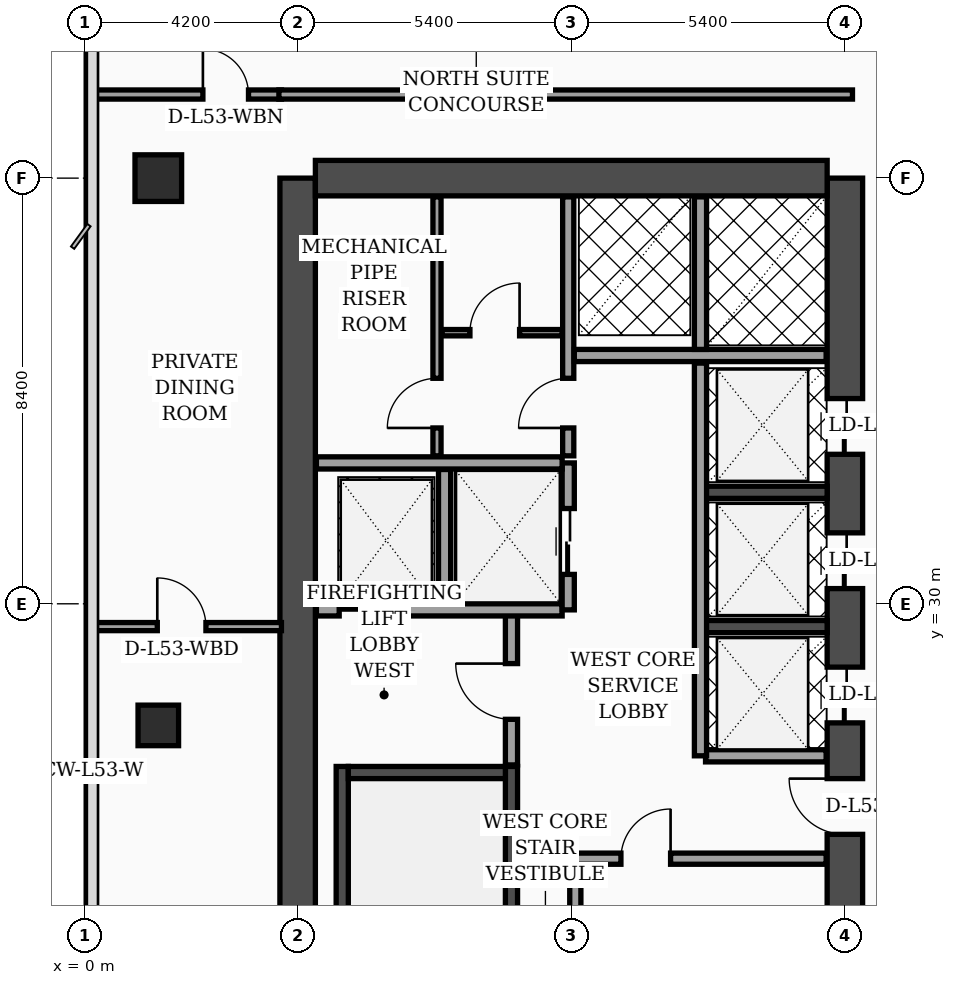
"""IFC4 building model, lengths in metres.
Left out: names, types, materials, properties, quantities, classifications, styles, units other than length and angle.
Written with IfcOpenShell. Run it as: python <this file> out.ifc"""

import sys

from ifc_helpers import new_model, si_unit, direction, frame, frame_2d, origin, origin_2d, place, context, subcontext, project, spatial, rectangle, extrude, element, fill, save


model = new_model("IFC4")
c1 = context("Model", 3, precision=1e-05, world=origin(), true_north=direction((0.0, 1.0)))
c2 = subcontext(c1, "Body", "Model", "MODEL_VIEW")
j1 = project(units=[si_unit("LENGTHUNIT", "METRE"), si_unit("PLANEANGLEUNIT", "RADIAN")], contexts=[c1])
p1 = place(None, origin())
s1 = spatial("IfcSite", under=j1, at=p1, CompositionType="ELEMENT")
p2 = place(p1, origin())
s2 = spatial("IfcBuilding", under=s1, at=p2, CompositionType="ELEMENT")
p3 = place(p2, frame((0.0, 0.0, 214.8)))
s3 = spatial("IfcBuildingStorey", under=s2, at=p3, CompositionType="ELEMENT", Elevation=214.8)
p4 = place(p3, frame((4.2, 16.8, 0.0), z_axis=(0.0, 0.0, 1.0), x_axis=(0.0, 1.0, 0.0)))
e1 = element("IfcWall", 1, at=p4, inside=s3, PredefinedType="SHEAR", context=c2, shape_type="SweptSolid", body=[
    extrude(rectangle(XDim=21.6, YDim=0.7, at=frame_2d((10.8, 0.0))), origin(), (0.0, 0.0, 1.0), 4.05),
])
p5 = place(p3, frame((15.0, 16.8, 0.0), z_axis=(0.0, 0.0, 1.0), x_axis=(0.0, 1.0, 0.0)))
e2 = element("IfcWall", 2, at=p5, inside=s3, PredefinedType="SHEAR", context=c2, shape_type="SweptSolid", body=[
    extrude(rectangle(XDim=21.6, YDim=0.7, at=frame_2d((10.8, 0.0))), origin(), (0.0, 0.0, 1.0), 4.05),
])
p6 = place(p5, frame((8.65, 0.0, 0.0)))
e3 = element("IfcOpeningElement", 3, at=p6, cuts=e2, PredefinedType="OPENING", context=c2, shape_type="SweptSolid", body=[
    extrude(rectangle(XDim=1.1, YDim=2.2, at=frame_2d((0.55, 1.1))), frame((0.0, 0.36, 0.0), z_axis=(0.0, -1.0, 0.0), x_axis=(1.0, 0.0, 0.0)), (0.0, 0.0, 1.0), 0.72),
])
p7 = place(p5, frame((10.85, 0.0, 0.0)))
e4 = element("IfcOpeningElement", 4, at=p7, cuts=e2, PredefinedType="OPENING", context=c2, shape_type="SweptSolid", body=[
    extrude(rectangle(XDim=1.1, YDim=2.2, at=frame_2d((0.55, 1.1))), frame((0.0, 0.36, 0.0), z_axis=(0.0, -1.0, 0.0), x_axis=(1.0, 0.0, 0.0)), (0.0, 0.0, 1.0), 0.72),
])
p8 = place(p5, frame((13.5, 0.0, 0.0)))
e5 = element("IfcOpeningElement", 5, at=p8, cuts=e2, PredefinedType="OPENING", context=c2, shape_type="SweptSolid", body=[
    extrude(rectangle(XDim=1.1, YDim=2.2, at=frame_2d((0.55, 1.1))), frame((0.0, 0.36, 0.0), z_axis=(0.0, -1.0, 0.0), x_axis=(1.0, 0.0, 0.0)), (0.0, 0.0, 1.0), 0.72),
])
p9 = place(p5, frame((16.15, 0.0, 0.0)))
e6 = element("IfcOpeningElement", 6, at=p9, cuts=e2, PredefinedType="OPENING", context=c2, shape_type="SweptSolid", body=[
    extrude(rectangle(XDim=1.1, YDim=2.2, at=frame_2d((0.55, 1.1))), frame((0.0, 0.36, 0.0), z_axis=(0.0, -1.0, 0.0), x_axis=(1.0, 0.0, 0.0)), (0.0, 0.0, 1.0), 0.72),
])
p10 = place(p3, frame((4.55, 38.4, 0.0), z_axis=(0.0, 0.0, 1.0), x_axis=(1.0, 0.0, 0.0)))
e7 = element("IfcWall", 7, at=p10, inside=s3, PredefinedType="SHEAR", context=c2, shape_type="SweptSolid", body=[
    extrude(rectangle(XDim=10.1, YDim=0.7, at=frame_2d((5.05, 0.0))), origin(), (0.0, 0.0, 1.0), 4.05),
])
p11 = place(p3, frame((5.08, 17.15, 0.0), z_axis=(0.0, 0.0, 1.0), x_axis=(0.0, 1.0, 0.0)))
e8 = element("IfcWall", 8, at=p11, inside=s3, PredefinedType="SOLIDWALL", context=c2, shape_type="SweptSolid", body=[
    extrude(rectangle(XDim=9.64, YDim=0.24, at=frame_2d((4.82, 0.0))), origin(), (0.0, 0.0, 1.0), 4.05),
])
p12 = place(p3, frame((8.42, 17.15, 0.0), z_axis=(0.0, 0.0, 1.0), x_axis=(0.0, 1.0, 0.0)))
e9 = element("IfcWall", 9, at=p12, inside=s3, PredefinedType="SOLIDWALL", context=c2, shape_type="SweptSolid", body=[
    extrude(rectangle(XDim=9.64, YDim=0.24, at=frame_2d((4.82, 0.0))), origin(), (0.0, 0.0, 1.0), 4.05),
])
p13 = place(p12, frame((0.35, 0.0, 0.0)))
e10 = element("IfcOpeningElement", 10, at=p13, cuts=e9, PredefinedType="OPENING", context=c2, shape_type="SweptSolid", body=[
    extrude(rectangle(XDim=1.15, YDim=2.2, at=frame_2d((0.575, 1.1))), frame((0.0, 0.13, 0.0), z_axis=(0.0, -1.0, 0.0), x_axis=(1.0, 0.0, 0.0)), (0.0, 0.0, 1.0), 0.26),
])
p14 = place(p3, frame((5.2, 26.67, 0.0), z_axis=(0.0, 0.0, 1.0), x_axis=(1.0, 0.0, 0.0)))
e11 = element("IfcWall", 11, at=p14, inside=s3, PredefinedType="SOLIDWALL", context=c2, shape_type="SweptSolid", body=[
    extrude(rectangle(XDim=3.1, YDim=0.24, at=frame_2d((1.55, 0.0))), origin(), (0.0, 0.0, 1.0), 4.05),
])
for number, where, z_axis, x_axis in (
    (12, (12.18, 29.55, 0.0), (0.0, 0.0, 1.0), (1.0, 0.0, 0.0)),
    (13, (12.18, 32.2, 0.0), (0.0, 0.0, 1.0), (1.0, 0.0, 0.0)),
):
    element("IfcWall", number, at=place(p3, frame(where, z_axis=z_axis, x_axis=x_axis)), inside=s3, PredefinedType="SOLIDWALL", context=c2, shape_type="SweptSolid", body=[
        extrude(rectangle(XDim=2.47, YDim=0.24, at=frame_2d((1.235, 0.0))), origin(), (0.0, 0.0, 1.0), 4.05),
    ])
p15 = place(p3, frame((1.45, 27.6, 0.0), z_axis=(0.0, 0.0, 1.0), x_axis=(1.0, 0.0, 0.0)))
e14 = element("IfcColumn", 14, at=p15, inside=s3, PredefinedType="COLUMN", context=c2, shape_type="SweptSolid", body=[
    extrude(rectangle(XDim=0.8, YDim=0.8, at=origin_2d()), origin(), (0.0, 0.0, 1.0), 4.05),
])
p16 = place(p3, frame((1.45, 38.4, 0.0), z_axis=(0.0, 0.0, 1.0), x_axis=(1.0, 0.0, 0.0)))
e15 = element("IfcColumn", 15, at=p16, inside=s3, PredefinedType="COLUMN", context=c2, shape_type="SweptSolid", body=[
    extrude(rectangle(XDim=0.92, YDim=0.92, at=origin_2d()), origin(), (0.0, 0.0, 1.0), 4.05),
])
p17 = place(p3, frame((8.42, 26.82, 0.0), z_axis=(0.0, 0.0, 1.0), x_axis=(0.0, 1.0, 0.0)))
e16 = element("IfcWall", 16, at=p17, inside=s3, PredefinedType="SOLIDWALL", context=c2, shape_type="SweptSolid", body=[
    extrude(rectangle(XDim=3.0, YDim=0.24, at=frame_2d((1.5, 0.0))), origin(), (0.0, 0.0, 1.0), 4.05),
])
p18 = place(p17, frame((0.9, 0.0, 0.0)))
e17 = element("IfcOpeningElement", 17, at=p18, cuts=e16, PredefinedType="OPENING", context=c2, shape_type="SweptSolid", body=[
    extrude(rectangle(XDim=1.1, YDim=2.2, at=frame_2d((0.55, 1.1))), frame((0.0, 0.13, 0.0), z_axis=(0.0, -1.0, 0.0), x_axis=(1.0, 0.0, 0.0)), (0.0, 0.0, 1.0), 0.26),
])
p19 = place(p3, frame((4.57, 29.88, 0.0), z_axis=(0.0, 0.0, 1.0), x_axis=(1.0, 0.0, 0.0)))
e18 = element("IfcWall", 18, at=p19, inside=s3, PredefinedType="SOLIDWALL", context=c2, shape_type="SweptSolid", body=[
    extrude(rectangle(XDim=4.85, YDim=0.24, at=frame_2d((2.425, 0.0))), origin(), (0.0, 0.0, 1.0), 4.05),
])
p20 = place(p19, frame((0.45, 0.0, 0.0)))
e19 = element("IfcOpeningElement", 19, at=p20, cuts=e18, PredefinedType="OPENING", context=c2, shape_type="SweptSolid", body=[
    extrude(rectangle(XDim=1.3, YDim=2.35, at=frame_2d((0.65, 1.175))), frame((0.0, 0.13, 0.0), z_axis=(0.0, -1.0, 0.0), x_axis=(1.0, 0.0, 0.0)), (0.0, 0.0, 1.0), 0.26),
])
p21 = place(p3, frame((7.1, 30.02, 0.0), z_axis=(0.0, 0.0, 1.0), x_axis=(0.0, 1.0, 0.0)))
e20 = element("IfcWall", 20, at=p21, inside=s3, PredefinedType="SOLIDWALL", context=c2, shape_type="SweptSolid", body=[
    extrude(rectangle(XDim=2.63, YDim=0.24, at=frame_2d((1.315, 0.0))), origin(), (0.0, 0.0, 1.0), 4.05),
])
p22 = place(p3, frame((9.54, 29.88, 0.0), z_axis=(0.0, 0.0, 1.0), x_axis=(0.0, 1.0, 0.0)))
e21 = element("IfcWall", 21, at=p22, inside=s3, PredefinedType="SOLIDWALL", context=c2, shape_type="SweptSolid", body=[
    extrude(rectangle(XDim=2.9, YDim=0.24, at=frame_2d((1.45, 0.0))), origin(), (0.0, 0.0, 1.0), 4.05),
])
p23 = place(p22, frame((0.7, 0.0, 0.0)))
e22 = element("IfcOpeningElement", 22, at=p23, cuts=e21, PredefinedType="OPENING", context=c2, shape_type="SweptSolid", body=[
    extrude(rectangle(XDim=1.3, YDim=2.35, at=frame_2d((0.65, 1.175))), frame((0.0, 0.13, 0.0), z_axis=(0.0, -1.0, 0.0), x_axis=(1.0, 0.0, 0.0)), (0.0, 0.0, 1.0), 0.26),
])
p24 = place(p3, frame((4.57, 32.78, 0.0), z_axis=(0.0, 0.0, 1.0), x_axis=(1.0, 0.0, 0.0)))
e23 = element("IfcWall", 23, at=p24, inside=s3, PredefinedType="SOLIDWALL", context=c2, shape_type="SweptSolid", body=[
    extrude(rectangle(XDim=4.85, YDim=0.24, at=frame_2d((2.425, 0.0))), origin(), (0.0, 0.0, 1.0), 3.7),
])
p25 = place(p3, frame((9.68, 17.17, 0.0), z_axis=(0.0, 0.0, 1.0), x_axis=(0.0, 1.0, 0.0)))
e24 = element("IfcWall", 24, at=p25, inside=s3, PredefinedType="SOLIDWALL", context=c2, shape_type="SweptSolid", body=[
    extrude(rectangle(XDim=7.83, YDim=0.22, at=frame_2d((3.915, 0.0))), origin(), (0.0, 0.0, 1.0), 4.05),
])
p26 = place(p3, frame((6.95, 32.92, 0.0), z_axis=(0.0, 0.0, 1.0), x_axis=(0.0, 1.0, 0.0)))
e25 = element("IfcWall", 25, at=p26, inside=s3, PredefinedType="PARTITIONING", context=c2, shape_type="SweptSolid", body=[
    extrude(rectangle(XDim=5.11, YDim=0.16, at=frame_2d((2.555, 0.0))), origin(), (0.0, 0.0, 1.0), 4.05),
])
p27 = place(p26, frame((0.55, 0.0, 0.0)))
e26 = element("IfcOpeningElement", 26, at=p27, cuts=e25, PredefinedType="OPENING", context=c2, shape_type="SweptSolid", body=[
    extrude(rectangle(XDim=0.98, YDim=2.15, at=frame_2d((0.49, 1.075))), frame((0.0, 0.09, 0.0), z_axis=(0.0, -1.0, 0.0), x_axis=(1.0, 0.0, 0.0)), (0.0, 0.0, 1.0), 0.18),
])
p28 = place(p3, frame((7.05, 35.35, 0.0), z_axis=(0.0, 0.0, 1.0), x_axis=(1.0, 0.0, 0.0)))
e27 = element("IfcWall", 27, at=p28, inside=s3, PredefinedType="PARTITIONING", context=c2, shape_type="SweptSolid", body=[
    extrude(rectangle(XDim=2.37, YDim=0.125, at=frame_2d((1.185, 0.0))), origin(), (0.0, 0.0, 1.0), 4.05),
])
p29 = place(p28, frame((0.55, 0.0, 0.0)))
e28 = element("IfcOpeningElement", 28, at=p29, cuts=e27, PredefinedType="OPENING", context=c2, shape_type="SweptSolid", body=[
    extrude(rectangle(XDim=0.98, YDim=2.15, at=frame_2d((0.49, 1.075))), frame((0.0, 0.073, 0.0), z_axis=(0.0, -1.0, 0.0), x_axis=(1.0, 0.0, 0.0)), (0.0, 0.0, 1.0), 0.145),
])
p30 = place(p3, frame((9.54, 32.92, 0.0), z_axis=(0.0, 0.0, 1.0), x_axis=(0.0, 1.0, 0.0)))
e29 = element("IfcWall", 29, at=p30, inside=s3, PredefinedType="SOLIDWALL", context=c2, shape_type="SweptSolid", body=[
    extrude(rectangle(XDim=5.11, YDim=0.22, at=frame_2d((2.555, 0.0))), origin(), (0.0, 0.0, 1.0), 4.05),
])
p31 = place(p30, frame((0.55, 0.0, 0.0)))
e30 = element("IfcOpeningElement", 30, at=p31, cuts=e29, PredefinedType="OPENING", context=c2, shape_type="SweptSolid", body=[
    extrude(rectangle(XDim=0.98, YDim=2.15, at=frame_2d((0.49, 1.075))), frame((0.0, 0.12, 0.0), z_axis=(0.0, -1.0, 0.0), x_axis=(1.0, 0.0, 0.0)), (0.0, 0.0, 1.0), 0.24),
])
p32 = place(p3, frame((9.68, 24.97, 0.0), z_axis=(0.0, 0.0, 1.0), x_axis=(1.0, 0.0, 0.0)))
e31 = element("IfcWall", 31, at=p32, inside=s3, PredefinedType="SOLIDWALL", context=c2, shape_type="SweptSolid", body=[
    extrude(rectangle(XDim=4.95, YDim=0.22, at=frame_2d((2.475, 0.0))), origin(), (0.0, 0.0, 1.0), 3.45),
])
p33 = place(p32, frame((0.9, 0.0, 0.0)))
e32 = element("IfcOpeningElement", 32, at=p33, cuts=e31, PredefinedType="OPENING", context=c2, shape_type="SweptSolid", body=[
    extrude(rectangle(XDim=0.98, YDim=2.15, at=frame_2d((0.49, 1.075))), frame((0.0, 0.12, 0.0), z_axis=(0.0, -1.0, 0.0), x_axis=(1.0, 0.0, 0.0)), (0.0, 0.0, 1.0), 0.24),
])
p34 = place(p3, frame((12.25, 27.0, 0.0), z_axis=(0.0, 0.0, 1.0), x_axis=(1.0, 0.0, 0.0)))
e33 = element("IfcWall", 33, at=p34, inside=s3, PredefinedType="SOLIDWALL", context=c2, shape_type="SweptSolid", body=[
    extrude(rectangle(XDim=2.38, YDim=0.24, at=frame_2d((1.19, 0.0))), origin(), (0.0, 0.0, 1.0), 4.05),
])
p35 = place(p3, frame((12.15, 27.0, 0.0), z_axis=(0.0, 0.0, 1.0), x_axis=(0.0, 1.0, 0.0)))
e34 = element("IfcWall", 34, at=p35, inside=s3, PredefinedType="SOLIDWALL", context=c2, shape_type="SweptSolid", body=[
    extrude(rectangle(XDim=7.75, YDim=0.24, at=frame_2d((3.875, 0.0))), origin(), (0.0, 0.0, 1.0), 4.05),
])
p36 = place(p3, frame((9.66, 34.9, 0.0), z_axis=(0.0, 0.0, 1.0), x_axis=(1.0, 0.0, 0.0)))
e35 = element("IfcWall", 35, at=p36, inside=s3, PredefinedType="SOLIDWALL", context=c2, shape_type="SweptSolid", body=[
    extrude(rectangle(XDim=4.97, YDim=0.24, at=frame_2d((2.485, 0.0))), origin(), (0.0, 0.0, 1.0), 4.05),
])
p37 = place(p3, frame((12.15, 35.02, 0.0), z_axis=(0.0, 0.0, 1.0), x_axis=(0.0, 1.0, 0.0)))
e36 = element("IfcWall", 36, at=p37, inside=s3, PredefinedType="SOLIDWALL", context=c2, shape_type="SweptSolid", body=[
    extrude(rectangle(XDim=3.01, YDim=0.24, at=frame_2d((1.505, 0.0))), origin(), (0.0, 0.0, 1.0), 4.05),
])
p38 = place(p3, frame((0.08, 29.55, 0.0), z_axis=(0.0, 0.0, 1.0), x_axis=(1.0, 0.0, 0.0)))
e37 = element("IfcWall", 37, at=p38, inside=s3, PredefinedType="PARTITIONING", context=c2, shape_type="SweptSolid", body=[
    extrude(rectangle(XDim=3.8, YDim=0.16, at=frame_2d((1.9, 0.0))), origin(), (0.0, 0.0, 1.0), 3.6),
])
p39 = place(p38, frame((1.35, 0.0, 0.0)))
e38 = element("IfcOpeningElement", 38, at=p39, cuts=e37, PredefinedType="OPENING", context=c2, shape_type="SweptSolid", body=[
    extrude(rectangle(XDim=0.96, YDim=2.2, at=frame_2d((0.48, 1.1))), frame((0.0, 0.09, 0.0), z_axis=(0.0, -1.0, 0.0), x_axis=(1.0, 0.0, 0.0)), (0.0, 0.0, 1.0), 0.18),
])
p40 = place(p3, frame((0.08, 40.05, 0.0), z_axis=(0.0, 0.0, 1.0), x_axis=(1.0, 0.0, 0.0)))
e39 = element("IfcWall", 39, at=p40, inside=s3, PredefinedType="PARTITIONING", context=c2, shape_type="SweptSolid", body=[
    extrude(rectangle(XDim=3.8, YDim=0.18, at=frame_2d((1.9, 0.0))), origin(), (0.0, 0.0, 1.0), 3.45),
])
p41 = place(p40, frame((2.25, 0.0, 0.0)))
e40 = element("IfcOpeningElement", 40, at=p41, cuts=e39, PredefinedType="OPENING", context=c2, shape_type="SweptSolid", body=[
    extrude(rectangle(XDim=0.9, YDim=2.15, at=frame_2d((0.45, 1.075))), frame((0.0, 0.1, 0.0), z_axis=(0.0, -1.0, 0.0), x_axis=(1.0, 0.0, 0.0)), (0.0, 0.0, 1.0), 0.2),
])
p42 = place(p3, frame((3.83, 40.05, 0.0), z_axis=(0.0, 0.0, 1.0), x_axis=(1.0, 0.0, 0.0)))
e41 = element("IfcWall", 41, at=p42, inside=s3, PredefinedType="PARTITIONING", context=c2, shape_type="SweptSolid", body=[
    extrude(rectangle(XDim=11.32, YDim=0.18, at=frame_2d((5.66, 0.0))), origin(), (0.0, 0.0, 1.0), 3.45),
])
p43 = place(p18, origin())
e42 = element("IfcDoor", 42, at=p43, inside=s3, OperationType="SINGLE_SWING_RIGHT", PredefinedType="DOOR", context=c2, shape_type="SweptSolid", body=[
    extrude(rectangle(XDim=1.1, YDim=2.2, at=frame_2d((0.55, 1.1))), frame((0.0, 0.025, 0.0), z_axis=(0.0, -1.0, 0.0), x_axis=(1.0, 0.0, 0.0)), (0.0, 0.0, 1.0), 0.05),
])
fill(e17, e42)
p44 = place(p20, origin())
e43 = element("IfcDoor", 43, at=p44, inside=s3, OperationType="DOUBLE_DOOR_SLIDING", PredefinedType="DOOR", context=c2, shape_type="SweptSolid", body=[
    extrude(rectangle(XDim=1.3, YDim=2.35, at=frame_2d((0.65, 1.175))), frame((0.0, 0.025, 0.0), z_axis=(0.0, -1.0, 0.0), x_axis=(1.0, 0.0, 0.0)), (0.0, 0.0, 1.0), 0.05),
])
fill(e19, e43)
p45 = place(p23, origin())
e44 = element("IfcDoor", 44, at=p45, inside=s3, OperationType="DOUBLE_DOOR_SLIDING", PredefinedType="DOOR", context=c2, shape_type="SweptSolid", body=[
    extrude(rectangle(XDim=1.3, YDim=2.35, at=frame_2d((0.65, 1.175))), frame((0.0, 0.025, 0.0), z_axis=(0.0, -1.0, 0.0), x_axis=(1.0, 0.0, 0.0)), (0.0, 0.0, 1.0), 0.05),
])
fill(e22, e44)
p46 = place(p27, origin())
e45 = element("IfcDoor", 45, at=p46, inside=s3, OperationType="SINGLE_SWING_LEFT", PredefinedType="DOOR", context=c2, shape_type="SweptSolid", body=[
    extrude(rectangle(XDim=0.98, YDim=2.15, at=frame_2d((0.49, 1.075))), frame((0.0, 0.025, 0.0), z_axis=(0.0, -1.0, 0.0), x_axis=(1.0, 0.0, 0.0)), (0.0, 0.0, 1.0), 0.05),
])
fill(e26, e45)
p47 = place(p29, origin())
e46 = element("IfcDoor", 46, at=p47, inside=s3, OperationType="SINGLE_SWING_RIGHT", PredefinedType="DOOR", context=c2, shape_type="SweptSolid", body=[
    extrude(rectangle(XDim=0.98, YDim=2.15, at=frame_2d((0.49, 1.075))), frame((0.0, 0.025, 0.0), z_axis=(0.0, -1.0, 0.0), x_axis=(1.0, 0.0, 0.0)), (0.0, 0.0, 1.0), 0.05),
])
fill(e28, e46)
p48 = place(p31, origin())
e47 = element("IfcDoor", 47, at=p48, inside=s3, OperationType="SINGLE_SWING_LEFT", PredefinedType="DOOR", context=c2, shape_type="SweptSolid", body=[
    extrude(rectangle(XDim=0.98, YDim=2.15, at=frame_2d((0.49, 1.075))), frame((0.0, 0.025, 0.0), z_axis=(0.0, -1.0, 0.0), x_axis=(1.0, 0.0, 0.0)), (0.0, 0.0, 1.0), 0.05),
])
fill(e30, e47)
p49 = place(p33, origin())
e48 = element("IfcDoor", 48, at=p49, inside=s3, OperationType="SINGLE_SWING_RIGHT", PredefinedType="DOOR", context=c2, shape_type="SweptSolid", body=[
    extrude(rectangle(XDim=0.98, YDim=2.15, at=frame_2d((0.49, 1.075))), frame((0.0, 0.025, 0.0), z_axis=(0.0, -1.0, 0.0), x_axis=(1.0, 0.0, 0.0)), (0.0, 0.0, 1.0), 0.05),
])
fill(e32, e48)
p50 = place(p39, origin())
e49 = element("IfcDoor", 49, at=p50, inside=s3, OperationType="SINGLE_SWING_LEFT", PredefinedType="DOOR", context=c2, shape_type="SweptSolid", body=[
    extrude(rectangle(XDim=0.96, YDim=2.2, at=frame_2d((0.48, 1.1))), frame((0.0, 0.025, 0.0), z_axis=(0.0, -1.0, 0.0), x_axis=(1.0, 0.0, 0.0)), (0.0, 0.0, 1.0), 0.05),
])
fill(e38, e49)
p51 = place(p41, origin())
e50 = element("IfcDoor", 50, at=p51, inside=s3, OperationType="SINGLE_SWING_LEFT", PredefinedType="DOOR", context=c2, shape_type="SweptSolid", body=[
    extrude(rectangle(XDim=0.9, YDim=2.15, at=frame_2d((0.45, 1.075))), frame((0.0, 0.025, 0.0), z_axis=(0.0, -1.0, 0.0), x_axis=(1.0, 0.0, 0.0)), (0.0, 0.0, 1.0), 0.05),
])
fill(e40, e50)
p52 = place(p6, origin())
e51 = element("IfcDoor", 51, at=p52, inside=s3, OperationType="SINGLE_SWING_RIGHT", PredefinedType="DOOR", context=c2, shape_type="SweptSolid", body=[
    extrude(rectangle(XDim=1.1, YDim=2.2, at=frame_2d((0.55, 1.1))), frame((0.0, 0.025, 0.0), z_axis=(0.0, -1.0, 0.0), x_axis=(1.0, 0.0, 0.0)), (0.0, 0.0, 1.0), 0.05),
])
fill(e3, e51)
p53 = place(p7, origin())
e52 = element("IfcDoor", 52, at=p53, inside=s3, OperationType="DOUBLE_DOOR_SLIDING", PredefinedType="DOOR", context=c2, shape_type="SweptSolid", body=[
    extrude(rectangle(XDim=1.1, YDim=2.2, at=frame_2d((0.55, 1.1))), frame((0.0, 0.025, 0.0), z_axis=(0.0, -1.0, 0.0), x_axis=(1.0, 0.0, 0.0)), (0.0, 0.0, 1.0), 0.05),
])
fill(e4, e52)
p54 = place(p8, origin())
e53 = element("IfcDoor", 53, at=p54, inside=s3, OperationType="DOUBLE_DOOR_SLIDING", PredefinedType="DOOR", context=c2, shape_type="SweptSolid", body=[
    extrude(rectangle(XDim=1.1, YDim=2.2, at=frame_2d((0.55, 1.1))), frame((0.0, 0.025, 0.0), z_axis=(0.0, -1.0, 0.0), x_axis=(1.0, 0.0, 0.0)), (0.0, 0.0, 1.0), 0.05),
])
fill(e5, e53)
p55 = place(p9, origin())
e54 = element("IfcDoor", 54, at=p55, inside=s3, OperationType="DOUBLE_DOOR_SLIDING", PredefinedType="DOOR", context=c2, shape_type="SweptSolid", body=[
    extrude(rectangle(XDim=1.1, YDim=2.2, at=frame_2d((0.55, 1.1))), frame((0.0, 0.025, 0.0), z_axis=(0.0, -1.0, 0.0), x_axis=(1.0, 0.0, 0.0)), (0.0, 0.0, 1.0), 0.05),
])
fill(e6, e54)
save(model, sys.argv[1])
